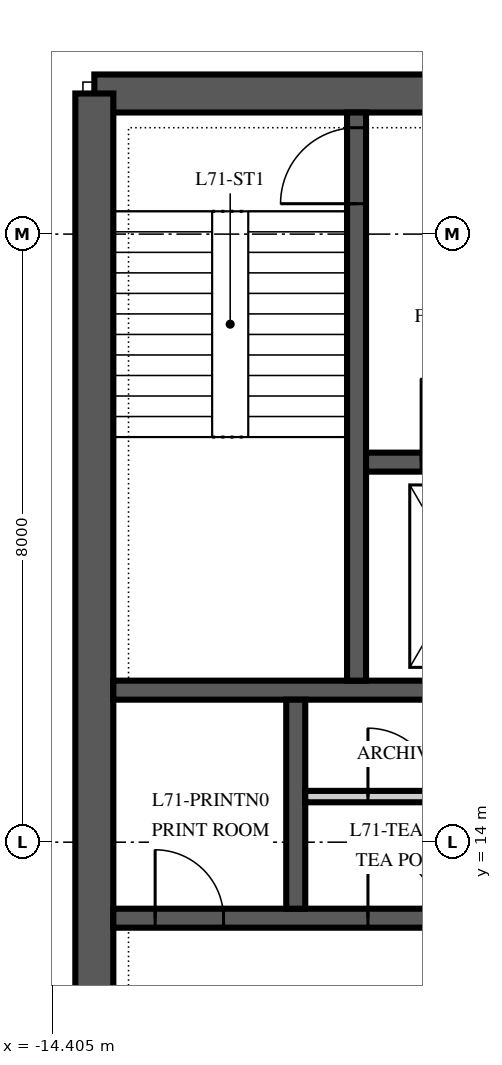
"""IFC4 building model, lengths in metres.
Left out: names, types, materials, properties, quantities, classifications, styles, units other than length and angle.
Written with IfcOpenShell. Run it as: python <this file> out.ifc"""

import sys

from ifc_helpers import new_model, si_unit, direction, frame, frame_2d, origin, place, context, subcontext, project, spatial, polyline, rectangle, outline, extrude, element, fill, save


model = new_model("IFC4")
c1 = context("Model", 3, precision=1e-05, world=origin(), true_north=direction((0.0, 1.0)))
c2 = subcontext(c1, "Body", "Model", "MODEL_VIEW")
j1 = project(units=[si_unit("LENGTHUNIT", "METRE"), si_unit("PLANEANGLEUNIT", "RADIAN")], contexts=[c1])
p1 = place(None, origin())
s1 = spatial("IfcSite", under=j1, at=p1, CompositionType="ELEMENT")
p2 = place(p1, origin())
s2 = spatial("IfcBuilding", under=s1, at=p2, CompositionType="ELEMENT")
p3 = place(p2, frame((0.0, 0.0, 304.0)))
s3 = spatial("IfcBuildingStorey", under=s2, at=p3, CompositionType="ELEMENT", Elevation=304.0)
p4 = place(p3, frame((13.85, 23.85, 0.0), z_axis=(0.0, 0.0, 1.0), x_axis=(-1.0, 0.0, 0.0)))
e1 = element("IfcWall", 1, at=p4, inside=s3, PredefinedType="SHEAR", context=c2, shape_type="SweptSolid", body=[
    extrude(rectangle(XDim=27.7, YDim=0.5, at=frame_2d((13.85, 0.0))), origin(), (0.0, 0.0, 1.0), 4.0),
])
p5 = place(p4, frame((21.75, 0.0, 0.0)))
e2 = element("IfcOpeningElement", 2, at=p5, cuts=e1, PredefinedType="OPENING", context=c2, shape_type="SweptSolid", body=[
    extrude(rectangle(XDim=1.0, YDim=2.1, at=frame_2d((0.5, 1.05))), frame((0.0, 0.265, 0.0), z_axis=(0.0, -1.0, 0.0), x_axis=(1.0, 0.0, 0.0)), (0.0, 0.0, 1.0), 0.53),
])
p6 = place(p4, frame((4.95, 0.0, 0.0)))
e3 = element("IfcOpeningElement", 3, at=p6, cuts=e1, PredefinedType="OPENING", context=c2, shape_type="SweptSolid", body=[
    extrude(rectangle(XDim=1.0, YDim=2.1, at=frame_2d((0.5, 1.05))), frame((0.0, 0.265, 0.0), z_axis=(0.0, -1.0, 0.0), x_axis=(1.0, 0.0, 0.0)), (0.0, 0.0, 1.0), 0.53),
])
p7 = place(p4, frame((17.35, 0.0, 0.0)))
e4 = element("IfcOpeningElement", 4, at=p7, cuts=e1, PredefinedType="OPENING", context=c2, shape_type="SweptSolid", body=[
    extrude(rectangle(XDim=1.0, YDim=2.1, at=frame_2d((0.5, 1.05))), frame((0.0, 0.265, 0.0), z_axis=(0.0, -1.0, 0.0), x_axis=(1.0, 0.0, 0.0)), (0.0, 0.0, 1.0), 0.53),
])
p8 = place(p4, frame((13.35, 0.0, 0.0)))
e5 = element("IfcOpeningElement", 5, at=p8, cuts=e1, PredefinedType="OPENING", context=c2, shape_type="SweptSolid", body=[
    extrude(rectangle(XDim=1.0, YDim=2.1, at=frame_2d((0.5, 1.05))), frame((0.0, 0.265, 0.0), z_axis=(0.0, -1.0, 0.0), x_axis=(1.0, 0.0, 0.0)), (0.0, 0.0, 1.0), 0.53),
])
p9 = place(p4, frame((9.35, 0.0, 0.0)))
e6 = element("IfcOpeningElement", 6, at=p9, cuts=e1, PredefinedType="OPENING", context=c2, shape_type="SweptSolid", body=[
    extrude(rectangle(XDim=1.0, YDim=2.1, at=frame_2d((0.5, 1.05))), frame((0.0, 0.265, 0.0), z_axis=(0.0, -1.0, 0.0), x_axis=(1.0, 0.0, 0.0)), (0.0, 0.0, 1.0), 0.53),
])
p10 = place(p3, frame((-13.85, 23.85, 0.0), z_axis=(0.0, 0.0, 1.0), x_axis=(0.0, -1.0, 0.0)))
e7 = element("IfcWall", 7, at=p10, inside=s3, PredefinedType="SHEAR", context=c2, shape_type="SweptSolid", body=[
    extrude(outline(polyline([(0.0, -0.25), (17.7, -0.25), (17.7, 0.0), (17.45, 0.0), (17.45, 0.25), (0.25, 0.25), (0.25, 0.0), (0.0, 0.0), (0.0, -0.25)])), origin(), (0.0, 0.0, 1.0), 4.0),
])
p11 = place(p10, frame((11.75, 0.0, 0.0)))
e8 = element("IfcOpeningElement", 8, at=p11, cuts=e7, PredefinedType="OPENING", context=c2, shape_type="SweptSolid", body=[
    extrude(rectangle(XDim=1.8, YDim=2.4, at=frame_2d((0.9, 1.2))), frame((0.0, 0.265, 0.0), z_axis=(0.0, -1.0, 0.0), x_axis=(1.0, 0.0, 0.0)), (0.0, 0.0, 1.0), 0.53),
])
p12 = place(p3, frame((-13.6, 13.0, 0.0), z_axis=(0.0, 0.0, 1.0), x_axis=(1.0, 0.0, 0.0)))
e9 = element("IfcWall", 9, at=p12, inside=s3, PredefinedType="SHEAR", context=c2, shape_type="SweptSolid", body=[
    extrude(rectangle(XDim=27.2, YDim=0.25, at=frame_2d((13.6, 0.0))), origin(), (0.0, 0.0, 1.0), 4.0),
])
p13 = place(p12, frame((16.75, 0.0, 0.0)))
e10 = element("IfcOpeningElement", 10, at=p13, cuts=e9, PredefinedType="OPENING", context=c2, shape_type="SweptSolid", body=[
    extrude(rectangle(XDim=0.9, YDim=2.1, at=frame_2d((0.45, 1.05))), frame((0.0, 0.14, 0.0), z_axis=(0.0, -1.0, 0.0), x_axis=(1.0, 0.0, 0.0)), (0.0, 0.0, 1.0), 0.28),
])
p14 = place(p12, frame((20.05, 0.0, 0.0)))
e11 = element("IfcOpeningElement", 11, at=p14, cuts=e9, PredefinedType="OPENING", context=c2, shape_type="SweptSolid", body=[
    extrude(rectangle(XDim=0.9, YDim=2.1, at=frame_2d((0.45, 1.05))), frame((0.0, 0.14, 0.0), z_axis=(0.0, -1.0, 0.0), x_axis=(1.0, 0.0, 0.0)), (0.0, 0.0, 1.0), 0.28),
])
p15 = place(p12, frame((22.05, 0.0, 0.0)))
e12 = element("IfcOpeningElement", 12, at=p15, cuts=e9, PredefinedType="OPENING", context=c2, shape_type="SweptSolid", body=[
    extrude(rectangle(XDim=0.9, YDim=2.1, at=frame_2d((0.45, 1.05))), frame((0.0, 0.14, 0.0), z_axis=(0.0, -1.0, 0.0), x_axis=(1.0, 0.0, 0.0)), (0.0, 0.0, 1.0), 0.28),
])
p16 = place(p12, frame((0.55, 0.0, 0.0)))
e13 = element("IfcOpeningElement", 13, at=p16, cuts=e9, PredefinedType="OPENING", context=c2, shape_type="SweptSolid", body=[
    extrude(rectangle(XDim=0.9, YDim=2.1, at=frame_2d((0.45, 1.05))), frame((0.0, 0.14, 0.0), z_axis=(0.0, -1.0, 0.0), x_axis=(1.0, 0.0, 0.0)), (0.0, 0.0, 1.0), 0.28),
])
p17 = place(p12, frame((3.35, 0.0, 0.0)))
e14 = element("IfcOpeningElement", 14, at=p17, cuts=e9, PredefinedType="OPENING", context=c2, shape_type="SweptSolid", body=[
    extrude(rectangle(XDim=0.9, YDim=2.1, at=frame_2d((0.45, 1.05))), frame((0.0, 0.14, 0.0), z_axis=(0.0, -1.0, 0.0), x_axis=(1.0, 0.0, 0.0)), (0.0, 0.0, 1.0), 0.28),
])
p18 = place(p12, frame((6.15, 0.0, 0.0)))
e15 = element("IfcOpeningElement", 15, at=p18, cuts=e9, PredefinedType="OPENING", context=c2, shape_type="SweptSolid", body=[
    extrude(rectangle(XDim=0.9, YDim=2.1, at=frame_2d((0.45, 1.05))), frame((0.0, 0.14, 0.0), z_axis=(0.0, -1.0, 0.0), x_axis=(1.0, 0.0, 0.0)), (0.0, 0.0, 1.0), 0.28),
])
p19 = place(p3, frame((-13.6, 16.0, 0.0), z_axis=(0.0, 0.0, 1.0), x_axis=(1.0, 0.0, 0.0)))
e16 = element("IfcWall", 16, at=p19, inside=s3, PredefinedType="SHEAR", context=c2, shape_type="SweptSolid", body=[
    extrude(rectangle(XDim=27.2, YDim=0.25, at=frame_2d((13.6, 0.0))), origin(), (0.0, 0.0, 1.0), 4.0),
])
p20 = place(p3, frame((-11.2, 13.125, 0.0), z_axis=(0.0, 0.0, 1.0), x_axis=(0.0, 1.0, 0.0)))
e17 = element("IfcWall", 17, at=p20, inside=s3, PredefinedType="SHEAR", context=c2, shape_type="SweptSolid", body=[
    extrude(rectangle(XDim=2.75, YDim=0.25, at=frame_2d((1.375, 0.0))), origin(), (0.0, 0.0, 1.0), 4.0),
])
p21 = place(p3, frame((-10.4, 16.125, 0.0), z_axis=(0.0, 0.0, 1.0), x_axis=(0.0, 1.0, 0.0)))
e18 = element("IfcWall", 18, at=p21, inside=s3, PredefinedType="SHEAR", context=c2, shape_type="SweptSolid", body=[
    extrude(rectangle(XDim=7.475, YDim=0.25, at=frame_2d((3.738, 0.0))), origin(), (0.0, 0.0, 1.0), 4.0),
])
p22 = place(p21, frame((6.275, 0.0, 0.0)))
e19 = element("IfcOpeningElement", 19, at=p22, cuts=e18, PredefinedType="OPENING", context=c2, shape_type="SweptSolid", body=[
    extrude(rectangle(XDim=1.0, YDim=2.1, at=frame_2d((0.5, 1.05))), frame((0.0, 0.14, 0.0), z_axis=(0.0, -1.0, 0.0), x_axis=(1.0, 0.0, 0.0)), (0.0, 0.0, 1.0), 0.28),
])
p23 = place(p3, frame((-10.275, 19.0, 0.0), z_axis=(0.0, 0.0, 1.0), x_axis=(1.0, 0.0, 0.0)))
e20 = element("IfcWall", 20, at=p23, inside=s3, PredefinedType="SHEAR", context=c2, shape_type="SweptSolid", body=[
    extrude(rectangle(XDim=3.75, YDim=0.25, at=frame_2d((1.875, 0.0))), origin(), (0.0, 0.0, 1.0), 4.0),
])
p24 = place(p23, frame((0.725, 0.0, 0.0)))
e21 = element("IfcOpeningElement", 21, at=p24, cuts=e20, PredefinedType="OPENING", context=c2, shape_type="SweptSolid", body=[
    extrude(rectangle(XDim=1.1, YDim=2.1, at=frame_2d((0.55, 1.05))), frame((0.0, 0.14, 0.0), z_axis=(0.0, -1.0, 0.0), x_axis=(1.0, 0.0, 0.0)), (0.0, 0.0, 1.0), 0.28),
])
p25 = place(p3, frame((-11.075, 14.6, 0.0), z_axis=(0.0, 0.0, 1.0), x_axis=(1.0, 0.0, 0.0)))
e22 = element("IfcWall", 22, at=p25, inside=s3, PredefinedType="PARTITIONING", context=c2, shape_type="SweptSolid", body=[
    extrude(rectangle(XDim=2.55, YDim=0.15, at=frame_2d((1.275, 0.0))), origin(), (0.0, 0.0, 1.0), 3.85),
])
p26 = place(p25, frame((0.825, 0.0, 0.0)))
e23 = element("IfcOpeningElement", 23, at=p26, cuts=e22, PredefinedType="OPENING", context=c2, shape_type="SweptSolid", body=[
    extrude(rectangle(XDim=0.9, YDim=2.1, at=frame_2d((0.45, 1.05))), frame((0.0, 0.09, 0.0), z_axis=(0.0, -1.0, 0.0), x_axis=(1.0, 0.0, 0.0)), (0.0, 0.0, 1.0), 0.18),
])
p27 = place(p22, origin())
e24 = element("IfcDoor", 24, at=p27, inside=s3, OperationType="SINGLE_SWING_LEFT", PredefinedType="DOOR", context=c2, shape_type="SweptSolid", body=[
    extrude(rectangle(XDim=1.0, YDim=2.1, at=frame_2d((0.5, 1.05))), frame((0.0, 0.125, 0.0), z_axis=(0.0, -1.0, 0.0), x_axis=(1.0, 0.0, 0.0)), (0.0, 0.0, 1.0), 0.25),
])
fill(e19, e24)
p28 = place(p24, origin())
e25 = element("IfcDoor", 25, at=p28, inside=s3, OperationType="SLIDING_TO_RIGHT", PredefinedType="DOOR", context=c2, shape_type="SweptSolid", body=[
    extrude(rectangle(XDim=1.1, YDim=2.1, at=frame_2d((0.55, 1.05))), frame((0.0, 0.125, 0.0), z_axis=(0.0, -1.0, 0.0), x_axis=(1.0, 0.0, 0.0)), (0.0, 0.0, 1.0), 0.25),
])
fill(e21, e25)
p29 = place(p16, origin())
e26 = element("IfcDoor", 26, at=p29, inside=s3, OperationType="SINGLE_SWING_LEFT", PredefinedType="DOOR", context=c2, shape_type="SweptSolid", body=[
    extrude(rectangle(XDim=0.9, YDim=2.1, at=frame_2d((0.45, 1.05))), frame((0.0, 0.125, 0.0), z_axis=(0.0, -1.0, 0.0), x_axis=(1.0, 0.0, 0.0)), (0.0, 0.0, 1.0), 0.25),
])
fill(e13, e26)
p30 = place(p17, origin())
e27 = element("IfcDoor", 27, at=p30, inside=s3, OperationType="SINGLE_SWING_LEFT", PredefinedType="DOOR", context=c2, shape_type="SweptSolid", body=[
    extrude(rectangle(XDim=0.9, YDim=2.1, at=frame_2d((0.45, 1.05))), frame((0.0, 0.125, 0.0), z_axis=(0.0, -1.0, 0.0), x_axis=(1.0, 0.0, 0.0)), (0.0, 0.0, 1.0), 0.25),
])
fill(e14, e27)
p31 = place(p26, origin())
e28 = element("IfcDoor", 28, at=p31, inside=s3, OperationType="SINGLE_SWING_LEFT", PredefinedType="DOOR", context=c2, shape_type="SweptSolid", body=[
    extrude(rectangle(XDim=0.9, YDim=2.1, at=frame_2d((0.45, 1.05))), frame((0.0, 0.075, 0.0), z_axis=(0.0, -1.0, 0.0), x_axis=(1.0, 0.0, 0.0)), (0.0, 0.0, 1.0), 0.149),
])
fill(e23, e28)
save(model, sys.argv[1])
